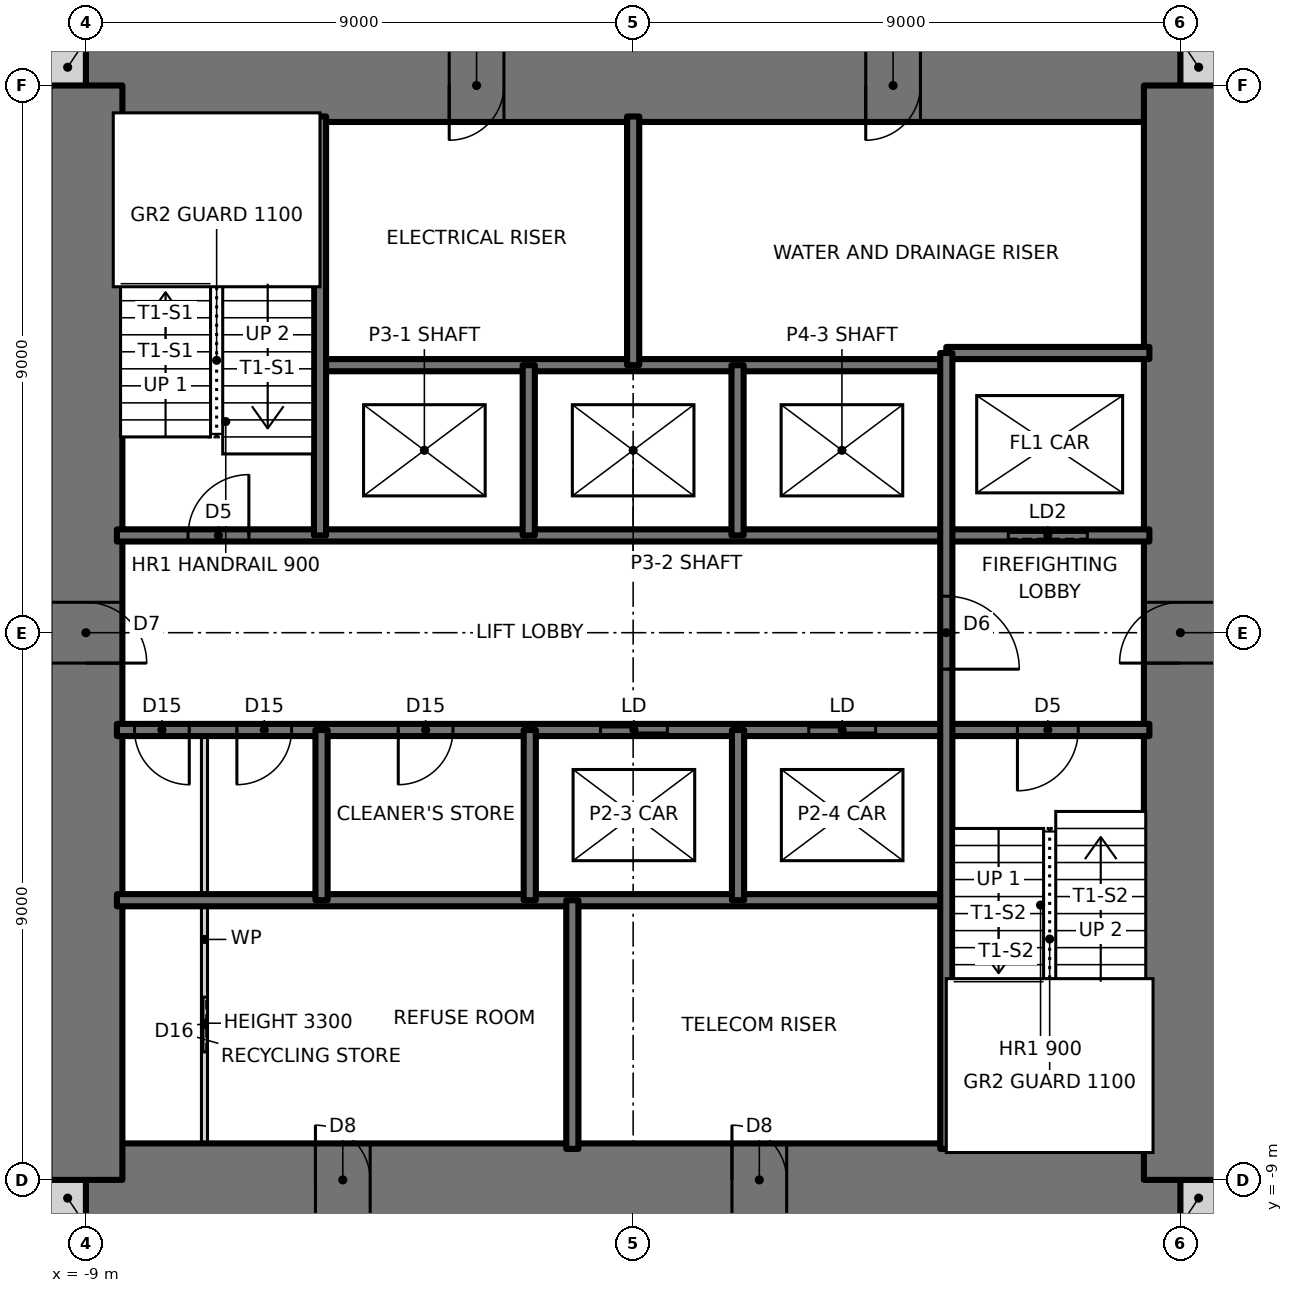
"""IFC4 building model, lengths in metres.
Left out: names, types, materials, properties, quantities, classifications, styles, units other than length and angle.
Written with IfcOpenShell. Run it as: python <this file> out.ifc"""

import sys

from ifc_helpers import new_model, si_unit, direction, frame, frame_2d, origin, place, context, subcontext, project, spatial, rectangle, extrude, element, fill, save


model = new_model("IFC4")
c1 = context("Model", 3, precision=1e-05, world=origin(), true_north=direction((0.0, 1.0)))
c2 = subcontext(c1, "Body", "Model", "MODEL_VIEW")
j1 = project(units=[si_unit("LENGTHUNIT", "METRE"), si_unit("PLANEANGLEUNIT", "RADIAN")], contexts=[c1])
p1 = place(None, origin())
s1 = spatial("IfcSite", under=j1, at=p1, CompositionType="ELEMENT")
p2 = place(p1, origin())
s2 = spatial("IfcBuilding", under=s1, at=p2, CompositionType="ELEMENT")
p3 = place(p2, frame((0.0, 0.0, 126.0)))
s3 = spatial("IfcBuildingStorey", under=s2, at=p3, CompositionType="ELEMENT", Elevation=126.0)
for number, where, z_axis, x_axis in (
    (1, (-9.6, -9.3, 0.0), (0.0, 0.0, 1.0), (1.0, 0.0, 0.0)),
    (2, (9.0, -9.3, 0.0), (0.0, 0.0, 1.0), (1.0, 0.0, 0.0)),
    (3, (9.0, 9.3, 0.0), (0.0, 0.0, 1.0), (1.0, 0.0, 0.0)),
    (4, (-9.6, 9.3, 0.0), (0.0, 0.0, 1.0), (1.0, 0.0, 0.0)),
):
    element("IfcWall", number, at=place(p3, frame(where, z_axis=z_axis, x_axis=x_axis)), inside=s3, PredefinedType="SOLIDWALL", context=c2, shape_type="SweptSolid", body=[
        extrude(rectangle(XDim=0.6, YDim=0.6, at=frame_2d((0.3, 0.0))), origin(), (0.0, 0.0, 1.0), 3.5),
    ])
p4 = place(p3, frame((-9.0, -9.0, 0.0), z_axis=(0.0, 0.0, 1.0), x_axis=(1.0, 0.0, 0.0)))
e5 = element("IfcWall", 5, at=p4, inside=s3, PredefinedType="SHEAR", context=c2, shape_type="SweptSolid", body=[
    extrude(rectangle(XDim=18.0, YDim=1.2, at=frame_2d((9.0, 0.0))), origin(), (0.0, 0.0, 1.0), 3.5),
])
p5 = place(p4, frame((3.775, 0.0, 0.0)))
e6 = element("IfcOpeningElement", 6, at=p5, cuts=e5, PredefinedType="OPENING", context=c2, shape_type="SweptSolid", body=[
    extrude(rectangle(XDim=0.9, YDim=2.1, at=frame_2d((0.45, 1.05))), frame((0.0, 0.61, 0.0), z_axis=(0.0, -1.0, 0.0), x_axis=(1.0, 0.0, 0.0)), (0.0, 0.0, 1.0), 1.22),
])
p6 = place(p4, frame((10.625, 0.0, 0.0)))
e7 = element("IfcOpeningElement", 7, at=p6, cuts=e5, PredefinedType="OPENING", context=c2, shape_type="SweptSolid", body=[
    extrude(rectangle(XDim=0.9, YDim=2.1, at=frame_2d((0.45, 1.05))), frame((0.0, 0.61, 0.0), z_axis=(0.0, -1.0, 0.0), x_axis=(1.0, 0.0, 0.0)), (0.0, 0.0, 1.0), 1.22),
])
p7 = place(p3, frame((9.0, 9.0, 0.0), z_axis=(0.0, 0.0, 1.0), x_axis=(-1.0, 0.0, 0.0)))
e8 = element("IfcWall", 8, at=p7, inside=s3, PredefinedType="SHEAR", context=c2, shape_type="SweptSolid", body=[
    extrude(rectangle(XDim=18.0, YDim=1.2, at=frame_2d((9.0, 0.0))), origin(), (0.0, 0.0, 1.0), 3.5),
])
p8 = place(p7, frame((11.125, 0.0, 0.0)))
e9 = element("IfcOpeningElement", 9, at=p8, cuts=e8, PredefinedType="OPENING", context=c2, shape_type="SweptSolid", body=[
    extrude(rectangle(XDim=0.9, YDim=2.1, at=frame_2d((0.45, 1.05))), frame((0.0, 0.61, 0.0), z_axis=(0.0, -1.0, 0.0), x_axis=(1.0, 0.0, 0.0)), (0.0, 0.0, 1.0), 1.22),
])
p9 = place(p7, frame((4.275, 0.0, 0.0)))
e10 = element("IfcOpeningElement", 10, at=p9, cuts=e8, PredefinedType="OPENING", context=c2, shape_type="SweptSolid", body=[
    extrude(rectangle(XDim=0.9, YDim=2.1, at=frame_2d((0.45, 1.05))), frame((0.0, 0.61, 0.0), z_axis=(0.0, -1.0, 0.0), x_axis=(1.0, 0.0, 0.0)), (0.0, 0.0, 1.0), 1.22),
])
p10 = place(p3, frame((9.0, -9.0, 0.0), z_axis=(0.0, 0.0, 1.0), x_axis=(0.0, 1.0, 0.0)))
e11 = element("IfcWall", 11, at=p10, inside=s3, PredefinedType="SHEAR", context=c2, shape_type="SweptSolid", body=[
    extrude(rectangle(XDim=18.0, YDim=1.2, at=frame_2d((9.0, 0.0))), origin(), (0.0, 0.0, 1.0), 3.5),
])
p11 = place(p10, frame((8.5, 0.0, 0.0)))
e12 = element("IfcOpeningElement", 12, at=p11, cuts=e11, PredefinedType="OPENING", context=c2, shape_type="SweptSolid", body=[
    extrude(rectangle(XDim=1.0, YDim=2.1, at=frame_2d((0.5, 1.05))), frame((0.0, 0.61, 0.0), z_axis=(0.0, -1.0, 0.0), x_axis=(1.0, 0.0, 0.0)), (0.0, 0.0, 1.0), 1.22),
])
p12 = place(p3, frame((-9.0, 9.0, 0.0), z_axis=(0.0, 0.0, 1.0), x_axis=(0.0, -1.0, 0.0)))
e13 = element("IfcWall", 13, at=p12, inside=s3, PredefinedType="SHEAR", context=c2, shape_type="SweptSolid", body=[
    extrude(rectangle(XDim=18.0, YDim=1.2, at=frame_2d((9.0, 0.0))), origin(), (0.0, 0.0, 1.0), 3.5),
])
p13 = place(p12, frame((8.5, 0.0, 0.0)))
e14 = element("IfcOpeningElement", 14, at=p13, cuts=e13, PredefinedType="OPENING", context=c2, shape_type="SweptSolid", body=[
    extrude(rectangle(XDim=1.0, YDim=2.1, at=frame_2d((0.5, 1.05))), frame((0.0, 0.61, 0.0), z_axis=(0.0, -1.0, 0.0), x_axis=(1.0, 0.0, 0.0)), (0.0, 0.0, 1.0), 1.22),
])
p14 = place(p3, frame((-8.49, -4.4, 0.0), z_axis=(0.0, 0.0, 1.0), x_axis=(1.0, 0.0, 0.0)))
e15 = element("IfcWall", 15, at=p14, inside=s3, PredefinedType="SOLIDWALL", context=c2, shape_type="SweptSolid", body=[
    extrude(rectangle(XDim=13.64, YDim=0.2, at=frame_2d((6.82, 0.0))), origin(), (0.0, 0.0, 1.0), 3.5),
])
p15 = place(p3, frame((-8.49, -1.6, 0.0), z_axis=(0.0, 0.0, 1.0), x_axis=(1.0, 0.0, 0.0)))
e16 = element("IfcWall", 16, at=p15, inside=s3, PredefinedType="SOLIDWALL", context=c2, shape_type="SweptSolid", body=[
    extrude(rectangle(XDim=16.98, YDim=0.2, at=frame_2d((8.49, 0.0))), origin(), (0.0, 0.0, 1.0), 3.5),
])
p16 = place(p15, frame((14.81, 0.0, 0.0)))
e17 = element("IfcOpeningElement", 17, at=p16, cuts=e16, PredefinedType="OPENING", context=c2, shape_type="SweptSolid", body=[
    extrude(rectangle(XDim=1.0, YDim=2.1, at=frame_2d((0.5, 1.05))), frame((0.0, 0.11, 0.0), z_axis=(0.0, -1.0, 0.0), x_axis=(1.0, 0.0, 0.0)), (0.0, 0.0, 1.0), 0.22),
])
p17 = place(p15, frame((1.973, 0.0, 0.0)))
e18 = element("IfcOpeningElement", 18, at=p17, cuts=e16, PredefinedType="OPENING", context=c2, shape_type="SweptSolid", body=[
    extrude(rectangle(XDim=0.9, YDim=2.1, at=frame_2d((0.45, 1.05))), frame((0.0, 0.11, 0.0), z_axis=(0.0, -1.0, 0.0), x_axis=(1.0, 0.0, 0.0)), (0.0, 0.0, 1.0), 0.22),
])
p18 = place(p15, frame((0.29, 0.0, 0.0)))
e19 = element("IfcOpeningElement", 19, at=p18, cuts=e16, PredefinedType="OPENING", context=c2, shape_type="SweptSolid", body=[
    extrude(rectangle(XDim=0.9, YDim=2.1, at=frame_2d((0.45, 1.05))), frame((0.0, 0.11, 0.0), z_axis=(0.0, -1.0, 0.0), x_axis=(1.0, 0.0, 0.0)), (0.0, 0.0, 1.0), 0.22),
])
p19 = place(p15, frame((4.627, 0.0, 0.0)))
e20 = element("IfcOpeningElement", 20, at=p19, cuts=e16, PredefinedType="OPENING", context=c2, shape_type="SweptSolid", body=[
    extrude(rectangle(XDim=0.9, YDim=2.1, at=frame_2d((0.45, 1.05))), frame((0.0, 0.11, 0.0), z_axis=(0.0, -1.0, 0.0), x_axis=(1.0, 0.0, 0.0)), (0.0, 0.0, 1.0), 0.22),
])
p20 = place(p15, frame((7.953, 0.0, 0.0)))
e21 = element("IfcOpeningElement", 21, at=p20, cuts=e16, PredefinedType="OPENING", context=c2, shape_type="SweptSolid", body=[
    extrude(rectangle(XDim=1.1, YDim=2.1, at=frame_2d((0.55, 1.05))), frame((0.0, 0.11, 0.0), z_axis=(0.0, -1.0, 0.0), x_axis=(1.0, 0.0, 0.0)), (0.0, 0.0, 1.0), 0.22),
])
p21 = place(p15, frame((11.378, 0.0, 0.0)))
e22 = element("IfcOpeningElement", 22, at=p21, cuts=e16, PredefinedType="OPENING", context=c2, shape_type="SweptSolid", body=[
    extrude(rectangle(XDim=1.1, YDim=2.1, at=frame_2d((0.55, 1.05))), frame((0.0, 0.11, 0.0), z_axis=(0.0, -1.0, 0.0), x_axis=(1.0, 0.0, 0.0)), (0.0, 0.0, 1.0), 0.22),
])
p22 = place(p3, frame((-8.49, 1.6, 0.0), z_axis=(0.0, 0.0, 1.0), x_axis=(1.0, 0.0, 0.0)))
e23 = element("IfcWall", 23, at=p22, inside=s3, PredefinedType="SOLIDWALL", context=c2, shape_type="SweptSolid", body=[
    extrude(rectangle(XDim=16.98, YDim=0.2, at=frame_2d((8.49, 0.0))), origin(), (0.0, 0.0, 1.0), 3.5),
])
p23 = place(p22, frame((1.17, 0.0, 0.0)))
e24 = element("IfcOpeningElement", 24, at=p23, cuts=e23, PredefinedType="OPENING", context=c2, shape_type="SweptSolid", body=[
    extrude(rectangle(XDim=1.0, YDim=2.1, at=frame_2d((0.5, 1.05))), frame((0.0, 0.11, 0.0), z_axis=(0.0, -1.0, 0.0), x_axis=(1.0, 0.0, 0.0)), (0.0, 0.0, 1.0), 0.22),
])
p24 = place(p22, frame((14.66, 0.0, 0.0)))
e25 = element("IfcOpeningElement", 25, at=p24, cuts=e23, PredefinedType="OPENING", context=c2, shape_type="SweptSolid", body=[
    extrude(rectangle(XDim=1.3, YDim=2.1, at=frame_2d((0.65, 1.05))), frame((0.0, 0.11, 0.0), z_axis=(0.0, -1.0, 0.0), x_axis=(1.0, 0.0, 0.0)), (0.0, 0.0, 1.0), 0.22),
])
p25 = place(p3, frame((-5.15, 4.4, 0.0), z_axis=(0.0, 0.0, 1.0), x_axis=(1.0, 0.0, 0.0)))
e26 = element("IfcWall", 26, at=p25, inside=s3, PredefinedType="SOLIDWALL", context=c2, shape_type="SweptSolid", body=[
    extrude(rectangle(XDim=10.3, YDim=0.2, at=frame_2d((5.15, 0.0))), origin(), (0.0, 0.0, 1.0), 3.5),
])
p26 = place(p3, frame((5.15, 4.6, 0.0), z_axis=(0.0, 0.0, 1.0), x_axis=(1.0, 0.0, 0.0)))
e27 = element("IfcWall", 27, at=p26, inside=s3, PredefinedType="SOLIDWALL", context=c2, shape_type="SweptSolid", body=[
    extrude(rectangle(XDim=3.34, YDim=0.2, at=frame_2d((1.67, 0.0))), origin(), (0.0, 0.0, 1.0), 3.5),
])
p27 = place(p3, frame((5.15, -8.49, 0.0), z_axis=(0.0, 0.0, 1.0), x_axis=(0.0, 1.0, 0.0)))
e28 = element("IfcWall", 28, at=p27, inside=s3, PredefinedType="SOLIDWALL", context=c2, shape_type="SweptSolid", body=[
    extrude(rectangle(XDim=13.09, YDim=0.2, at=frame_2d((6.545, 0.0))), origin(), (0.0, 0.0, 1.0), 3.5),
])
p28 = place(p27, frame((7.89, 0.0, 0.0)))
e29 = element("IfcOpeningElement", 29, at=p28, cuts=e28, PredefinedType="OPENING", context=c2, shape_type="SweptSolid", body=[
    extrude(rectangle(XDim=1.2, YDim=2.1, at=frame_2d((0.6, 1.05))), frame((0.0, 0.11, 0.0), z_axis=(0.0, -1.0, 0.0), x_axis=(1.0, 0.0, 0.0)), (0.0, 0.0, 1.0), 0.22),
])
for number, where, z_axis, x_axis in (
    (30, (1.725, -4.4, 0.0), (0.0, 0.0, 1.0), (0.0, 1.0, 0.0)),
    (31, (1.717, 1.6, 0.0), (0.0, 0.0, 1.0), (0.0, 1.0, 0.0)),
):
    element("IfcWall", number, at=place(p3, frame(where, z_axis=z_axis, x_axis=x_axis)), inside=s3, PredefinedType="SOLIDWALL", context=c2, shape_type="SweptSolid", body=[
        extrude(rectangle(XDim=2.8, YDim=0.2, at=frame_2d((1.4, 0.0))), origin(), (0.0, 0.0, 1.0), 3.5),
    ])
for number, where, z_axis, x_axis in (
    (32, (0.0, 4.4, 0.0), (0.0, 0.0, 1.0), (0.0, 1.0, 0.0)),
    (33, (-1.0, -8.49, 0.0), (0.0, 0.0, 1.0), (0.0, 1.0, 0.0)),
):
    element("IfcWall", number, at=place(p3, frame(where, z_axis=z_axis, x_axis=x_axis)), inside=s3, PredefinedType="SOLIDWALL", context=c2, shape_type="SweptSolid", body=[
        extrude(rectangle(XDim=4.09, YDim=0.2, at=frame_2d((2.045, 0.0))), origin(), (0.0, 0.0, 1.0), 3.5),
    ])
for number, where, z_axis, x_axis in (
    (34, (-1.7, -4.4, 0.0), (0.0, 0.0, 1.0), (0.0, 1.0, 0.0)),
    (35, (-1.717, 1.6, 0.0), (0.0, 0.0, 1.0), (0.0, 1.0, 0.0)),
    (36, (-5.125, -4.4, 0.0), (0.0, 0.0, 1.0), (0.0, 1.0, 0.0)),
):
    element("IfcWall", number, at=place(p3, frame(where, z_axis=z_axis, x_axis=x_axis)), inside=s3, PredefinedType="SOLIDWALL", context=c2, shape_type="SweptSolid", body=[
        extrude(rectangle(XDim=2.8, YDim=0.2, at=frame_2d((1.4, 0.0))), origin(), (0.0, 0.0, 1.0), 3.5),
    ])
p29 = place(p3, frame((-5.15, 1.6, 0.0), z_axis=(0.0, 0.0, 1.0), x_axis=(0.0, 1.0, 0.0)))
e37 = element("IfcWall", 37, at=p29, inside=s3, PredefinedType="SOLIDWALL", context=c2, shape_type="SweptSolid", body=[
    extrude(rectangle(XDim=6.89, YDim=0.2, at=frame_2d((3.445, 0.0))), origin(), (0.0, 0.0, 1.0), 3.5),
])
p30 = place(p3, frame((-7.05, -8.49, 0.0), z_axis=(0.0, 0.0, 1.0), x_axis=(0.0, 1.0, 0.0)))
e38 = element("IfcWall", 38, at=p30, inside=s3, PredefinedType="PARTITIONING", context=c2, shape_type="SweptSolid", body=[
    extrude(rectangle(XDim=6.89, YDim=0.1, at=frame_2d((3.445, 0.0))), origin(), (0.0, 0.0, 1.0), 3.3),
])
p31 = place(p30, frame((1.595, 0.0, 0.0)))
e39 = element("IfcOpeningElement", 39, at=p31, cuts=e38, PredefinedType="OPENING", context=c2, shape_type="SweptSolid", body=[
    extrude(rectangle(XDim=0.9, YDim=2.1, at=frame_2d((0.45, 1.05))), frame((0.0, 0.06, 0.0), z_axis=(0.0, -1.0, 0.0), x_axis=(1.0, 0.0, 0.0)), (0.0, 0.0, 1.0), 0.12),
])
p32 = place(p23, origin())
e40 = element("IfcDoor", 40, at=p32, inside=s3, OperationType="SINGLE_SWING_RIGHT", PredefinedType="DOOR", context=c2, shape_type="SweptSolid", body=[
    extrude(rectangle(XDim=1.0, YDim=2.1, at=frame_2d((0.5, 1.05))), frame((0.0, 0.025, 0.0), z_axis=(0.0, -1.0, 0.0), x_axis=(1.0, 0.0, 0.0)), (0.0, 0.0, 1.0), 0.05),
])
fill(e24, e40)
p33 = place(p16, frame((1.0, 0.0, 0.0), z_axis=(0.0, 0.0, 1.0), x_axis=(-1.0, 0.0, 0.0)))
e41 = element("IfcDoor", 41, at=p33, inside=s3, OperationType="SINGLE_SWING_RIGHT", PredefinedType="DOOR", context=c2, shape_type="SweptSolid", body=[
    extrude(rectangle(XDim=1.0, YDim=2.1, at=frame_2d((0.5, 1.05))), frame((0.0, 0.025, 0.0), z_axis=(0.0, -1.0, 0.0), x_axis=(1.0, 0.0, 0.0)), (0.0, 0.0, 1.0), 0.05),
])
fill(e17, e41)
p34 = place(p28, frame((1.2, 0.0, 0.0), z_axis=(0.0, 0.0, 1.0), x_axis=(-1.0, 0.0, 0.0)))
e42 = element("IfcDoor", 42, at=p34, inside=s3, OperationType="SINGLE_SWING_RIGHT", PredefinedType="DOOR", context=c2, shape_type="SweptSolid", body=[
    extrude(rectangle(XDim=1.2, YDim=2.1, at=frame_2d((0.6, 1.05))), frame((0.0, 0.025, 0.0), z_axis=(0.0, -1.0, 0.0), x_axis=(1.0, 0.0, 0.0)), (0.0, 0.0, 1.0), 0.05),
])
fill(e29, e42)
p35 = place(p17, frame((0.9, 0.0, 0.0), z_axis=(0.0, 0.0, 1.0), x_axis=(-1.0, 0.0, 0.0)))
e43 = element("IfcDoor", 43, at=p35, inside=s3, OperationType="SINGLE_SWING_RIGHT", PredefinedType="DOOR", context=c2, shape_type="SweptSolid", body=[
    extrude(rectangle(XDim=0.9, YDim=2.1, at=frame_2d((0.45, 1.05))), frame((0.0, 0.025, 0.0), z_axis=(0.0, -1.0, 0.0), x_axis=(1.0, 0.0, 0.0)), (0.0, 0.0, 1.0), 0.05),
])
fill(e18, e43)
p36 = place(p18, frame((0.9, 0.0, 0.0), z_axis=(0.0, 0.0, 1.0), x_axis=(-1.0, 0.0, 0.0)))
e44 = element("IfcDoor", 44, at=p36, inside=s3, OperationType="SINGLE_SWING_LEFT", PredefinedType="DOOR", context=c2, shape_type="SweptSolid", body=[
    extrude(rectangle(XDim=0.9, YDim=2.1, at=frame_2d((0.45, 1.05))), frame((0.0, 0.025, 0.0), z_axis=(0.0, -1.0, 0.0), x_axis=(1.0, 0.0, 0.0)), (0.0, 0.0, 1.0), 0.05),
])
fill(e19, e44)
p37 = place(p19, frame((0.9, 0.0, 0.0), z_axis=(0.0, 0.0, 1.0), x_axis=(-1.0, 0.0, 0.0)))
e45 = element("IfcDoor", 45, at=p37, inside=s3, OperationType="SINGLE_SWING_RIGHT", PredefinedType="DOOR", context=c2, shape_type="SweptSolid", body=[
    extrude(rectangle(XDim=0.9, YDim=2.1, at=frame_2d((0.45, 1.05))), frame((0.0, 0.025, 0.0), z_axis=(0.0, -1.0, 0.0), x_axis=(1.0, 0.0, 0.0)), (0.0, 0.0, 1.0), 0.05),
])
fill(e20, e45)
p38 = place(p31, origin())
e46 = element("IfcDoor", 46, at=p38, inside=s3, OperationType="SLIDING_TO_RIGHT", PredefinedType="DOOR", context=c2, shape_type="SweptSolid", body=[
    extrude(rectangle(XDim=0.9, YDim=2.1, at=frame_2d((0.45, 1.05))), frame((0.0, 0.025, 0.0), z_axis=(0.0, -1.0, 0.0), x_axis=(1.0, 0.0, 0.0)), (0.0, 0.0, 1.0), 0.05),
])
fill(e39, e46)
p39 = place(p13, origin())
e47 = element("IfcDoor", 47, at=p39, inside=s3, OperationType="SINGLE_SWING_RIGHT", PredefinedType="DOOR", context=c2, shape_type="SweptSolid", body=[
    extrude(rectangle(XDim=1.0, YDim=2.1, at=frame_2d((0.5, 1.05))), frame((0.0, 0.025, 0.0), z_axis=(0.0, -1.0, 0.0), x_axis=(1.0, 0.0, 0.0)), (0.0, 0.0, 1.0), 0.05),
])
fill(e14, e47)
p40 = place(p11, origin())
e48 = element("IfcDoor", 48, at=p40, inside=s3, OperationType="SINGLE_SWING_LEFT", PredefinedType="DOOR", context=c2, shape_type="SweptSolid", body=[
    extrude(rectangle(XDim=1.0, YDim=2.1, at=frame_2d((0.5, 1.05))), frame((0.0, 0.025, 0.0), z_axis=(0.0, -1.0, 0.0), x_axis=(1.0, 0.0, 0.0)), (0.0, 0.0, 1.0), 0.05),
])
fill(e12, e48)
p41 = place(p8, origin())
e49 = element("IfcDoor", 49, at=p41, inside=s3, OperationType="SINGLE_SWING_RIGHT", PredefinedType="DOOR", context=c2, shape_type="SweptSolid", body=[
    extrude(rectangle(XDim=0.9, YDim=2.1, at=frame_2d((0.45, 1.05))), frame((0.0, 0.025, 0.0), z_axis=(0.0, -1.0, 0.0), x_axis=(1.0, 0.0, 0.0)), (0.0, 0.0, 1.0), 0.05),
])
fill(e9, e49)
p42 = place(p9, origin())
e50 = element("IfcDoor", 50, at=p42, inside=s3, OperationType="SINGLE_SWING_RIGHT", PredefinedType="DOOR", context=c2, shape_type="SweptSolid", body=[
    extrude(rectangle(XDim=0.9, YDim=2.1, at=frame_2d((0.45, 1.05))), frame((0.0, 0.025, 0.0), z_axis=(0.0, -1.0, 0.0), x_axis=(1.0, 0.0, 0.0)), (0.0, 0.0, 1.0), 0.05),
])
fill(e10, e50)
p43 = place(p5, origin())
e51 = element("IfcDoor", 51, at=p43, inside=s3, OperationType="SINGLE_SWING_LEFT", PredefinedType="DOOR", context=c2, shape_type="SweptSolid", body=[
    extrude(rectangle(XDim=0.9, YDim=2.1, at=frame_2d((0.45, 1.05))), frame((0.0, 0.025, 0.0), z_axis=(0.0, -1.0, 0.0), x_axis=(1.0, 0.0, 0.0)), (0.0, 0.0, 1.0), 0.05),
])
fill(e6, e51)
p44 = place(p6, origin())
e52 = element("IfcDoor", 52, at=p44, inside=s3, OperationType="SINGLE_SWING_LEFT", PredefinedType="DOOR", context=c2, shape_type="SweptSolid", body=[
    extrude(rectangle(XDim=0.9, YDim=2.1, at=frame_2d((0.45, 1.05))), frame((0.0, 0.025, 0.0), z_axis=(0.0, -1.0, 0.0), x_axis=(1.0, 0.0, 0.0)), (0.0, 0.0, 1.0), 0.05),
])
fill(e7, e52)
p45 = place(p20, origin())
e53 = element("IfcDoor", 53, at=p45, inside=s3, OperationType="DOUBLE_DOOR_SLIDING", PredefinedType="DOOR", context=c2, shape_type="SweptSolid", body=[
    extrude(rectangle(XDim=1.1, YDim=2.1, at=frame_2d((0.55, 1.05))), frame((0.0, 0.025, 0.0), z_axis=(0.0, -1.0, 0.0), x_axis=(1.0, 0.0, 0.0)), (0.0, 0.0, 1.0), 0.05),
])
fill(e21, e53)
p46 = place(p21, origin())
e54 = element("IfcDoor", 54, at=p46, inside=s3, OperationType="DOUBLE_DOOR_SLIDING", PredefinedType="DOOR", context=c2, shape_type="SweptSolid", body=[
    extrude(rectangle(XDim=1.1, YDim=2.1, at=frame_2d((0.55, 1.05))), frame((0.0, 0.025, 0.0), z_axis=(0.0, -1.0, 0.0), x_axis=(1.0, 0.0, 0.0)), (0.0, 0.0, 1.0), 0.05),
])
fill(e22, e54)
p47 = place(p24, origin())
e55 = element("IfcDoor", 55, at=p47, inside=s3, OperationType="SLIDING_TO_LEFT", PredefinedType="DOOR", context=c2, shape_type="SweptSolid", body=[
    extrude(rectangle(XDim=1.3, YDim=2.1, at=frame_2d((0.65, 1.05))), frame((0.0, 0.025, 0.0), z_axis=(0.0, -1.0, 0.0), x_axis=(1.0, 0.0, 0.0)), (0.0, 0.0, 1.0), 0.05),
])
fill(e25, e55)
save(model, sys.argv[1])
